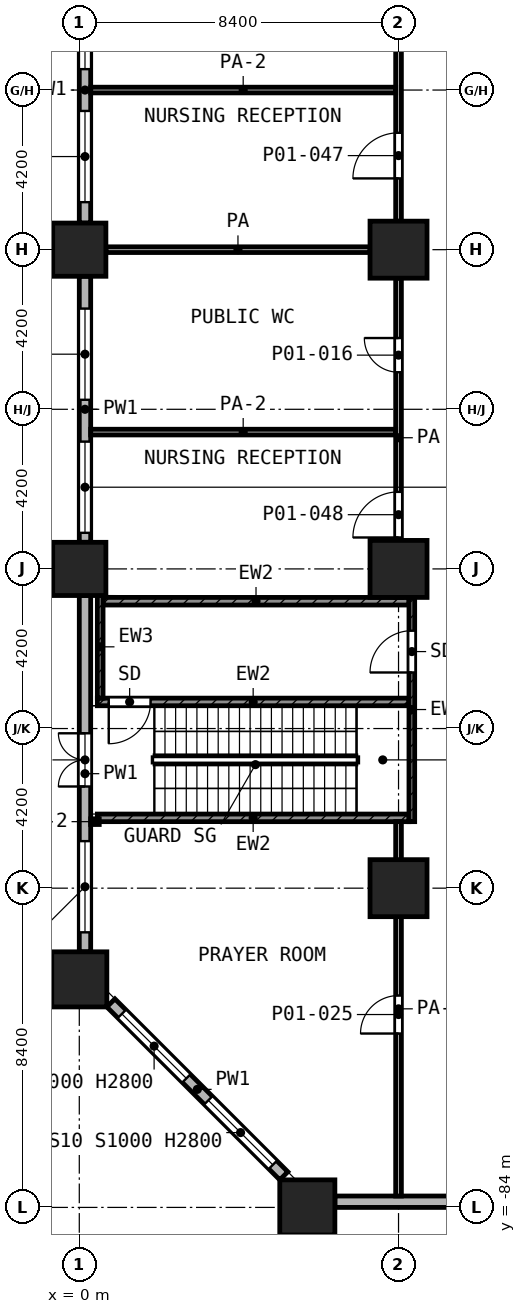
"""IFC4 building model, lengths in metres.
Left out: names, types, materials, properties, quantities, classifications, styles, units other than length and angle.
Written with IfcOpenShell. Run it as: python <this file> out.ifc"""

import sys

from ifc_helpers import new_model, si_unit, direction, frame, frame_2d, origin, origin_2d, place, context, subcontext, project, spatial, rectangle, extrude, element, fill, save


model = new_model("IFC4")
c1 = context("Model", 3, precision=1e-05, world=origin(), true_north=direction((0.0, 1.0)))
c2 = subcontext(c1, "Body", "Model", "MODEL_VIEW")
j1 = project(units=[si_unit("LENGTHUNIT", "METRE"), si_unit("PLANEANGLEUNIT", "RADIAN")], contexts=[c1])
p1 = place(None, origin())
s1 = spatial("IfcSite", under=j1, at=p1, CompositionType="ELEMENT")
p2 = place(p1, origin())
s2 = spatial("IfcBuilding", under=s1, at=p2, CompositionType="ELEMENT")
p3 = place(p2, origin())
s3 = spatial("IfcBuildingStorey", under=s2, at=p3, CompositionType="ELEMENT", Elevation=0.0)
p4 = place(p3, frame((0.0, -58.8, 0.0), z_axis=(0.0, 0.0, 1.0), x_axis=(1.0, 0.0, 0.0)))
e1 = element("IfcColumn", 1, at=p4, inside=s3, PredefinedType="COLUMN", context=c2, shape_type="SweptSolid", body=[
    extrude(rectangle(XDim=1.4, YDim=1.4, at=origin_2d()), origin(), (0.0, 0.0, 1.0), 7.0),
])
p5 = place(p3, frame((8.4, -58.8, 0.0), z_axis=(0.0, 0.0, 1.0), x_axis=(1.0, 0.0, 0.0)))
e2 = element("IfcColumn", 2, at=p5, inside=s3, PredefinedType="COLUMN", context=c2, shape_type="SweptSolid", body=[
    extrude(rectangle(XDim=1.5, YDim=1.5, at=origin_2d()), origin(), (0.0, 0.0, 1.0), 7.0),
])
p6 = place(p3, frame((0.0, -67.2, 0.0), z_axis=(0.0, 0.0, 1.0), x_axis=(1.0, 0.0, 0.0)))
e3 = element("IfcColumn", 3, at=p6, inside=s3, PredefinedType="COLUMN", context=c2, shape_type="SweptSolid", body=[
    extrude(rectangle(XDim=1.4, YDim=1.4, at=origin_2d()), origin(), (0.0, 0.0, 1.0), 7.0),
])
for number, where, z_axis, x_axis in (
    (4, (8.4, -67.2, 0.0), (0.0, 0.0, 1.0), (1.0, 0.0, 0.0)),
    (5, (8.4, -75.6, 0.0), (0.0, 0.0, 1.0), (1.0, 0.0, 0.0)),
):
    element("IfcColumn", number, at=place(p3, frame(where, z_axis=z_axis, x_axis=x_axis)), inside=s3, PredefinedType="COLUMN", context=c2, shape_type="SweptSolid", body=[
        extrude(rectangle(XDim=1.5, YDim=1.5, at=origin_2d()), origin(), (0.0, 0.0, 1.0), 7.0),
    ])
for number, where, z_axis, x_axis in (
    (6, (0.0, -78.0, 0.0), (0.0, 0.0, 1.0), (1.0, 0.0, 0.0)),
    (7, (6.0, -84.0, 0.0), (0.0, 0.0, 1.0), (1.0, 0.0, 0.0)),
):
    element("IfcColumn", number, at=place(p3, frame(where, z_axis=z_axis, x_axis=x_axis)), inside=s3, PredefinedType="COLUMN", context=c2, shape_type="SweptSolid", body=[
        extrude(rectangle(XDim=1.45, YDim=1.45, at=origin_2d()), origin(), (0.0, 0.0, 1.0), 7.0),
    ])
p7 = place(p3, frame((0.15, -51.1, 0.0), z_axis=(0.0, 0.0, 1.0), x_axis=(0.0, -1.0, 0.0)))
e8 = element("IfcWall", 8, at=p7, inside=s3, PredefinedType="SOLIDWALL", context=c2, shape_type="SweptSolid", body=[
    extrude(rectangle(XDim=7.0, YDim=0.3, at=frame_2d((3.5, 0.0))), origin(), (0.0, 0.0, 1.0), 5.25),
])
p8 = place(p7, frame((0.55, 0.0, 1.0)))
e9 = element("IfcOpeningElement", 9, at=p8, cuts=e8, PredefinedType="OPENING", context=c2, shape_type="SweptSolid", body=[
    extrude(rectangle(XDim=2.4, YDim=1.8, at=frame_2d((1.2, 0.9))), frame((0.0, 0.16, 0.0), z_axis=(0.0, -1.0, 0.0), x_axis=(1.0, 0.0, 0.0)), (0.0, 0.0, 1.0), 0.32),
])
p9 = place(p7, frame((4.05, 0.0, 1.0)))
e10 = element("IfcOpeningElement", 10, at=p9, cuts=e8, PredefinedType="OPENING", context=c2, shape_type="SweptSolid", body=[
    extrude(rectangle(XDim=2.4, YDim=1.8, at=frame_2d((1.2, 0.9))), frame((0.0, 0.16, 0.0), z_axis=(0.0, -1.0, 0.0), x_axis=(1.0, 0.0, 0.0)), (0.0, 0.0, 1.0), 0.32),
])
p10 = place(p3, frame((0.15, -59.5, 0.0), z_axis=(0.0, 0.0, 1.0), x_axis=(0.0, -1.0, 0.0)))
e11 = element("IfcWall", 11, at=p10, inside=s3, PredefinedType="SOLIDWALL", context=c2, shape_type="SweptSolid", body=[
    extrude(rectangle(XDim=7.0, YDim=0.3, at=frame_2d((3.5, 0.0))), origin(), (0.0, 0.0, 1.0), 5.25),
])
p11 = place(p10, frame((0.85, 0.0, 1.0)))
e12 = element("IfcOpeningElement", 12, at=p11, cuts=e11, PredefinedType="OPENING", context=c2, shape_type="SweptSolid", body=[
    extrude(rectangle(XDim=2.4, YDim=1.8, at=frame_2d((1.2, 0.9))), frame((0.0, 0.16, 0.0), z_axis=(0.0, -1.0, 0.0), x_axis=(1.0, 0.0, 0.0)), (0.0, 0.0, 1.0), 0.32),
])
p12 = place(p10, frame((4.35, 0.0, 1.0)))
e13 = element("IfcOpeningElement", 13, at=p12, cuts=e11, PredefinedType="OPENING", context=c2, shape_type="SweptSolid", body=[
    extrude(rectangle(XDim=2.4, YDim=1.8, at=frame_2d((1.2, 0.9))), frame((0.0, 0.16, 0.0), z_axis=(0.0, -1.0, 0.0), x_axis=(1.0, 0.0, 0.0)), (0.0, 0.0, 1.0), 0.32),
])
p13 = place(p3, frame((0.15, -67.9, 0.0), z_axis=(0.0, 0.0, 1.0), x_axis=(0.0, -1.0, 0.0)))
e14 = element("IfcWall", 14, at=p13, inside=s3, PredefinedType="SOLIDWALL", context=c2, shape_type="SweptSolid", body=[
    extrude(rectangle(XDim=9.375, YDim=0.3, at=frame_2d((4.688, 0.0))), origin(), (0.0, 0.0, 1.0), 5.25),
])
p14 = place(p13, frame((3.625, 0.0, 0.0)))
e15 = element("IfcOpeningElement", 15, at=p14, cuts=e14, PredefinedType="OPENING", context=c2, shape_type="SweptSolid", body=[
    extrude(rectangle(XDim=1.4, YDim=2.1, at=frame_2d((0.7, 1.05))), frame((0.0, 0.16, 0.0), z_axis=(0.0, -1.0, 0.0), x_axis=(1.0, 0.0, 0.0)), (0.0, 0.0, 1.0), 0.32),
])
p15 = place(p13, frame((6.462, 0.0, 1.0)))
e16 = element("IfcOpeningElement", 16, at=p15, cuts=e14, PredefinedType="OPENING", context=c2, shape_type="SweptSolid", body=[
    extrude(rectangle(XDim=2.4, YDim=1.8, at=frame_2d((1.2, 0.9))), frame((0.0, 0.16, 0.0), z_axis=(0.0, -1.0, 0.0), x_axis=(1.0, 0.0, 0.0)), (0.0, 0.0, 1.0), 0.32),
])
p16 = place(p3, frame((0.831, -78.619, 0.0), z_axis=(0.0, 0.0, 1.0), x_axis=(0.707106781187, -0.707106781187, 0.0)))
e17 = element("IfcWall", 17, at=p16, inside=s3, PredefinedType="SOLIDWALL", context=c2, shape_type="SweptSolid", body=[
    extrude(rectangle(XDim=6.435, YDim=0.3, at=frame_2d((3.217, 0.0))), origin(), (0.0, 0.0, 1.0), 5.25),
])
p17 = place(p16, frame((0.409, 0.0, 1.0)))
e18 = element("IfcOpeningElement", 18, at=p17, cuts=e17, PredefinedType="OPENING", context=c2, shape_type="SweptSolid", body=[
    extrude(rectangle(XDim=2.4, YDim=1.8, at=frame_2d((1.2, 0.9))), frame((0.0, 0.16, 0.0), z_axis=(0.0, -1.0, 0.0), x_axis=(1.0, 0.0, 0.0)), (0.0, 0.0, 1.0), 0.32),
])
p18 = place(p16, frame((3.626, 0.0, 1.0)))
e19 = element("IfcOpeningElement", 19, at=p18, cuts=e17, PredefinedType="OPENING", context=c2, shape_type="SweptSolid", body=[
    extrude(rectangle(XDim=2.4, YDim=1.8, at=frame_2d((1.2, 0.9))), frame((0.0, 0.16, 0.0), z_axis=(0.0, -1.0, 0.0), x_axis=(1.0, 0.0, 0.0)), (0.0, 0.0, 1.0), 0.32),
])
p19 = place(p3, frame((6.725, -83.85, 0.0), z_axis=(0.0, 0.0, 1.0), x_axis=(1.0, 0.0, 0.0)))
e20 = element("IfcWall", 20, at=p19, inside=s3, PredefinedType="SOLIDWALL", context=c2, shape_type="SweptSolid", body=[
    extrude(rectangle(XDim=9.375, YDim=0.3, at=frame_2d((4.688, 0.0))), origin(), (0.0, 0.0, 1.0), 5.25),
])
p20 = place(p19, frame((3.775, 0.0, 0.0)))
e21 = element("IfcOpeningElement", 21, at=p20, cuts=e20, PredefinedType="OPENING", context=c2, shape_type="SweptSolid", body=[
    extrude(rectangle(XDim=1.0, YDim=2.1, at=frame_2d((0.5, 1.05))), frame((0.0, 0.16, 0.0), z_axis=(0.0, -1.0, 0.0), x_axis=(1.0, 0.0, 0.0)), (0.0, 0.0, 1.0), 0.32),
])
p21 = place(p3, frame((0.55, -70.6, 0.0), z_axis=(0.0, 0.0, 1.0), x_axis=(0.0, 1.0, 0.0)))
e22 = element("IfcWall", 22, at=p21, inside=s3, PredefinedType="SHEAR", context=c2, shape_type="SweptSolid", body=[
    extrude(rectangle(XDim=2.7, YDim=0.15, at=frame_2d((1.35, 0.0))), origin(), (0.0, 0.0, 1.0), 6.65),
])
p22 = place(p3, frame((8.75, -73.85, 0.0), z_axis=(0.0, 0.0, 1.0), x_axis=(0.0, 1.0, 0.0)))
e23 = element("IfcWall", 23, at=p22, inside=s3, PredefinedType="SHEAR", context=c2, shape_type="SweptSolid", body=[
    extrude(rectangle(XDim=5.9, YDim=0.15, at=frame_2d((2.95, 0.0))), origin(), (0.0, 0.0, 1.0), 6.65),
])
p23 = place(p22, frame((3.925, 0.0, 0.0)))
e24 = element("IfcOpeningElement", 24, at=p23, cuts=e23, PredefinedType="OPENING", context=c2, shape_type="SweptSolid", body=[
    extrude(rectangle(XDim=1.1, YDim=2.1, at=frame_2d((0.55, 1.05))), frame((0.0, 0.085, 0.0), z_axis=(0.0, -1.0, 0.0), x_axis=(1.0, 0.0, 0.0)), (0.0, 0.0, 1.0), 0.17),
])
p24 = place(p3, frame((0.475, -73.75, 0.0), z_axis=(0.0, 0.0, 1.0), x_axis=(1.0, 0.0, 0.0)))
e25 = element("IfcWall", 25, at=p24, inside=s3, PredefinedType="SHEAR", context=c2, shape_type="SweptSolid", body=[
    extrude(rectangle(XDim=8.2, YDim=0.2, at=frame_2d((4.1, 0.0))), origin(), (0.0, 0.0, 1.0), 6.65),
])
p25 = place(p3, frame((0.475, -70.7, 0.0), z_axis=(0.0, 0.0, 1.0), x_axis=(1.0, 0.0, 0.0)))
e26 = element("IfcWall", 26, at=p25, inside=s3, PredefinedType="SHEAR", context=c2, shape_type="SweptSolid", body=[
    extrude(rectangle(XDim=8.2, YDim=0.2, at=frame_2d((4.1, 0.0))), origin(), (0.0, 0.0, 1.0), 6.65),
])
p26 = place(p25, frame((0.3, 0.0, 0.0)))
e27 = element("IfcOpeningElement", 27, at=p26, cuts=e26, PredefinedType="OPENING", context=c2, shape_type="SweptSolid", body=[
    extrude(rectangle(XDim=1.1, YDim=2.1, at=frame_2d((0.55, 1.05))), frame((0.0, 0.11, 0.0), z_axis=(0.0, -1.0, 0.0), x_axis=(1.0, 0.0, 0.0)), (0.0, 0.0, 1.0), 0.22),
])
p27 = place(p3, frame((0.625, -68.05, 0.0), z_axis=(0.0, 0.0, 1.0), x_axis=(1.0, 0.0, 0.0)))
e28 = element("IfcWall", 28, at=p27, inside=s3, PredefinedType="SHEAR", context=c2, shape_type="SweptSolid", body=[
    extrude(rectangle(XDim=8.05, YDim=0.2, at=frame_2d((4.025, 0.0))), origin(), (0.0, 0.0, 1.0), 6.65),
])
p28 = place(p3, frame((0.3, -73.85, 0.0), z_axis=(0.0, 0.0, 1.0), x_axis=(1.0, 0.0, 0.0)))
e29 = element("IfcWall", 29, at=p28, inside=s3, PredefinedType="PARTITIONING", context=c2, shape_type="SweptSolid", body=[
    extrude(rectangle(XDim=0.225, YDim=0.15, at=frame_2d((0.112, 0.0))), origin(), (0.0, 0.0, 1.0), 5.25),
])
p29 = place(p3, frame((0.3, -63.6, 0.0), z_axis=(0.0, 0.0, 1.0), x_axis=(1.0, 0.0, 0.0)))
e30 = element("IfcWall", 30, at=p29, inside=s3, PredefinedType="PARTITIONING", context=c2, shape_type="SweptSolid", body=[
    extrude(rectangle(XDim=8.025, YDim=0.15, at=frame_2d((4.012, 0.0))), origin(), (0.0, 0.0, 1.0), 5.25),
])
p30 = place(p3, frame((0.7, -58.8, 0.0), z_axis=(0.0, 0.0, 1.0), x_axis=(1.0, 0.0, 0.0)))
e31 = element("IfcWall", 31, at=p30, inside=s3, PredefinedType="PARTITIONING", context=c2, shape_type="SweptSolid", body=[
    extrude(rectangle(XDim=6.95, YDim=0.15, at=frame_2d((3.475, 0.0))), origin(), (0.0, 0.0, 1.0), 6.65),
])
p31 = place(p3, frame((0.3, -54.6, 0.0), z_axis=(0.0, 0.0, 1.0), x_axis=(1.0, 0.0, 0.0)))
e32 = element("IfcWall", 32, at=p31, inside=s3, PredefinedType="PARTITIONING", context=c2, shape_type="SweptSolid", body=[
    extrude(rectangle(XDim=8.025, YDim=0.15, at=frame_2d((4.012, 0.0))), origin(), (0.0, 0.0, 1.0), 5.25),
])
p32 = place(p3, frame((8.4, -83.7, 0.0), z_axis=(0.0, 0.0, 1.0), x_axis=(0.0, 1.0, 0.0)))
e33 = element("IfcWall", 33, at=p32, inside=s3, PredefinedType="PARTITIONING", context=c2, shape_type="SweptSolid", body=[
    extrude(rectangle(XDim=9.85, YDim=0.15, at=frame_2d((4.925, 0.0))), origin(), (0.0, 0.0, 1.0), 5.25),
])
p33 = place(p32, frame((4.275, 0.0, 0.0)))
e34 = element("IfcOpeningElement", 34, at=p33, cuts=e33, PredefinedType="OPENING", context=c2, shape_type="SweptSolid", body=[
    extrude(rectangle(XDim=1.0, YDim=2.1, at=frame_2d((0.5, 1.05))), frame((0.0, 0.085, 0.0), z_axis=(0.0, -1.0, 0.0), x_axis=(1.0, 0.0, 0.0)), (0.0, 0.0, 1.0), 0.17),
])
p34 = place(p3, frame((8.4, -67.947, 0.0), z_axis=(0.0, 0.0, 1.0), x_axis=(0.0, 1.0, 0.0)))
e35 = element("IfcWall", 35, at=p34, inside=s3, PredefinedType="PARTITIONING", context=c2, shape_type="SweptSolid", body=[
    extrude(rectangle(XDim=8.397, YDim=0.15, at=frame_2d((4.198, 0.0))), origin(), (0.0, 0.0, 1.0), 6.65),
])
p35 = place(p34, frame((5.922, 0.0, 0.0)))
e36 = element("IfcOpeningElement", 36, at=p35, cuts=e35, PredefinedType="OPENING", context=c2, shape_type="SweptSolid", body=[
    extrude(rectangle(XDim=0.9, YDim=2.1, at=frame_2d((0.45, 1.05))), frame((0.0, 0.085, 0.0), z_axis=(0.0, -1.0, 0.0), x_axis=(1.0, 0.0, 0.0)), (0.0, 0.0, 1.0), 0.17),
])
p36 = place(p34, frame((1.574, 0.0, 0.0)))
e37 = element("IfcOpeningElement", 37, at=p36, cuts=e35, PredefinedType="OPENING", context=c2, shape_type="SweptSolid", body=[
    extrude(rectangle(XDim=1.2, YDim=2.1, at=frame_2d((0.6, 1.05))), frame((0.0, 0.085, 0.0), z_axis=(0.0, -1.0, 0.0), x_axis=(1.0, 0.0, 0.0)), (0.0, 0.0, 1.0), 0.17),
])
p37 = place(p3, frame((8.4, -58.05, 0.0), z_axis=(0.0, 0.0, 1.0), x_axis=(0.0, 1.0, 0.0)))
e38 = element("IfcWall", 38, at=p37, inside=s3, PredefinedType="PARTITIONING", context=c2, shape_type="SweptSolid", body=[
    extrude(rectangle(XDim=15.7, YDim=0.15, at=frame_2d((7.85, 0.0))), origin(), (0.0, 0.0, 1.0), 6.65),
])
p38 = place(p37, frame((8.975, 0.0, 0.0)))
e39 = element("IfcOpeningElement", 39, at=p38, cuts=e38, PredefinedType="OPENING", context=c2, shape_type="SweptSolid", body=[
    extrude(rectangle(XDim=1.2, YDim=2.1, at=frame_2d((0.6, 1.05))), frame((0.0, 0.085, 0.0), z_axis=(0.0, -1.0, 0.0), x_axis=(1.0, 0.0, 0.0)), (0.0, 0.0, 1.0), 0.17),
])
p39 = place(p37, frame((1.125, 0.0, 0.0)))
e40 = element("IfcOpeningElement", 40, at=p39, cuts=e38, PredefinedType="OPENING", context=c2, shape_type="SweptSolid", body=[
    extrude(rectangle(XDim=1.2, YDim=2.1, at=frame_2d((0.6, 1.05))), frame((0.0, 0.085, 0.0), z_axis=(0.0, -1.0, 0.0), x_axis=(1.0, 0.0, 0.0)), (0.0, 0.0, 1.0), 0.17),
])
p40 = place(p8, origin())
e41 = element("IfcWindow", 41, at=p40, inside=s3, PartitioningType="SINGLE_PANEL", PredefinedType="WINDOW", context=c2, shape_type="SweptSolid", body=[
    extrude(rectangle(XDim=2.4, YDim=1.8, at=frame_2d((1.2, 0.9))), frame((0.0, 0.03, 0.0), z_axis=(0.0, -1.0, 0.0), x_axis=(1.0, 0.0, 0.0)), (0.0, 0.0, 1.0), 0.06),
])
fill(e9, e41)
p41 = place(p9, origin())
e42 = element("IfcWindow", 42, at=p41, inside=s3, PartitioningType="SINGLE_PANEL", PredefinedType="WINDOW", context=c2, shape_type="SweptSolid", body=[
    extrude(rectangle(XDim=2.4, YDim=1.8, at=frame_2d((1.2, 0.9))), frame((0.0, 0.03, 0.0), z_axis=(0.0, -1.0, 0.0), x_axis=(1.0, 0.0, 0.0)), (0.0, 0.0, 1.0), 0.06),
])
fill(e10, e42)
p42 = place(p11, origin())
e43 = element("IfcWindow", 43, at=p42, inside=s3, PartitioningType="SINGLE_PANEL", PredefinedType="WINDOW", context=c2, shape_type="SweptSolid", body=[
    extrude(rectangle(XDim=2.4, YDim=1.8, at=frame_2d((1.2, 0.9))), frame((0.0, 0.03, 0.0), z_axis=(0.0, -1.0, 0.0), x_axis=(1.0, 0.0, 0.0)), (0.0, 0.0, 1.0), 0.06),
])
fill(e12, e43)
p43 = place(p12, origin())
e44 = element("IfcWindow", 44, at=p43, inside=s3, PartitioningType="SINGLE_PANEL", PredefinedType="WINDOW", context=c2, shape_type="SweptSolid", body=[
    extrude(rectangle(XDim=2.4, YDim=1.8, at=frame_2d((1.2, 0.9))), frame((0.0, 0.03, 0.0), z_axis=(0.0, -1.0, 0.0), x_axis=(1.0, 0.0, 0.0)), (0.0, 0.0, 1.0), 0.06),
])
fill(e13, e44)
p44 = place(p14, frame((1.4, 0.0, 0.0), z_axis=(0.0, 0.0, 1.0), x_axis=(-1.0, 0.0, 0.0)))
e45 = element("IfcDoor", 45, at=p44, inside=s3, OperationType="DOUBLE_DOOR_SINGLE_SWING", PredefinedType="DOOR", context=c2, shape_type="SweptSolid", body=[
    extrude(rectangle(XDim=1.4, YDim=2.1, at=frame_2d((0.7, 1.05))), frame((0.0, 0.025, 0.0), z_axis=(0.0, -1.0, 0.0), x_axis=(1.0, 0.0, 0.0)), (0.0, 0.0, 1.0), 0.05),
])
fill(e15, e45)
p45 = place(p15, origin())
e46 = element("IfcWindow", 46, at=p45, inside=s3, PartitioningType="SINGLE_PANEL", PredefinedType="WINDOW", context=c2, shape_type="SweptSolid", body=[
    extrude(rectangle(XDim=2.4, YDim=1.8, at=frame_2d((1.2, 0.9))), frame((0.0, 0.03, 0.0), z_axis=(0.0, -1.0, 0.0), x_axis=(1.0, 0.0, 0.0)), (0.0, 0.0, 1.0), 0.06),
])
fill(e16, e46)
p46 = place(p17, origin())
e47 = element("IfcWindow", 47, at=p46, inside=s3, PartitioningType="SINGLE_PANEL", PredefinedType="WINDOW", context=c2, shape_type="SweptSolid", body=[
    extrude(rectangle(XDim=2.4, YDim=1.8, at=frame_2d((1.2, 0.9))), frame((0.0, 0.03, 0.0), z_axis=(0.0, -1.0, 0.0), x_axis=(1.0, 0.0, 0.0)), (0.0, 0.0, 1.0), 0.06),
])
fill(e18, e47)
p47 = place(p18, origin())
e48 = element("IfcWindow", 48, at=p47, inside=s3, PartitioningType="SINGLE_PANEL", PredefinedType="WINDOW", context=c2, shape_type="SweptSolid", body=[
    extrude(rectangle(XDim=2.4, YDim=1.8, at=frame_2d((1.2, 0.9))), frame((0.0, 0.03, 0.0), z_axis=(0.0, -1.0, 0.0), x_axis=(1.0, 0.0, 0.0)), (0.0, 0.0, 1.0), 0.06),
])
fill(e19, e48)
p48 = place(p26, frame((1.1, 0.0, 0.0), z_axis=(0.0, 0.0, 1.0), x_axis=(-1.0, 0.0, 0.0)))
e49 = element("IfcDoor", 49, at=p48, inside=s3, OperationType="SINGLE_SWING_LEFT", PredefinedType="DOOR", context=c2, shape_type="SweptSolid", body=[
    extrude(rectangle(XDim=1.1, YDim=2.1, at=frame_2d((0.55, 1.05))), frame((0.0, 0.025, 0.0), z_axis=(0.0, -1.0, 0.0), x_axis=(1.0, 0.0, 0.0)), (0.0, 0.0, 1.0), 0.05),
])
fill(e27, e49)
p49 = place(p23, origin())
e50 = element("IfcDoor", 50, at=p49, inside=s3, OperationType="SINGLE_SWING_LEFT", PredefinedType="DOOR", context=c2, shape_type="SweptSolid", body=[
    extrude(rectangle(XDim=1.1, YDim=2.1, at=frame_2d((0.55, 1.05))), frame((0.0, 0.025, 0.0), z_axis=(0.0, -1.0, 0.0), x_axis=(1.0, 0.0, 0.0)), (0.0, 0.0, 1.0), 0.05),
])
fill(e24, e50)
p50 = place(p39, origin())
e51 = element("IfcDoor", 51, at=p50, inside=s3, OperationType="SINGLE_SWING_LEFT", PredefinedType="DOOR", context=c2, shape_type="SweptSolid", body=[
    extrude(rectangle(XDim=1.2, YDim=2.1, at=frame_2d((0.6, 1.05))), frame((0.0, 0.025, 0.0), z_axis=(0.0, -1.0, 0.0), x_axis=(1.0, 0.0, 0.0)), (0.0, 0.0, 1.0), 0.05),
])
fill(e40, e51)
p51 = place(p35, origin())
e52 = element("IfcDoor", 52, at=p51, inside=s3, OperationType="SINGLE_SWING_RIGHT", PredefinedType="DOOR", context=c2, shape_type="SweptSolid", body=[
    extrude(rectangle(XDim=0.9, YDim=2.1, at=frame_2d((0.45, 1.05))), frame((0.0, 0.025, 0.0), z_axis=(0.0, -1.0, 0.0), x_axis=(1.0, 0.0, 0.0)), (0.0, 0.0, 1.0), 0.05),
])
fill(e36, e52)
p52 = place(p36, origin())
e53 = element("IfcDoor", 53, at=p52, inside=s3, OperationType="SINGLE_SWING_LEFT", PredefinedType="DOOR", context=c2, shape_type="SweptSolid", body=[
    extrude(rectangle(XDim=1.2, YDim=2.1, at=frame_2d((0.6, 1.05))), frame((0.0, 0.025, 0.0), z_axis=(0.0, -1.0, 0.0), x_axis=(1.0, 0.0, 0.0)), (0.0, 0.0, 1.0), 0.05),
])
fill(e37, e53)
p53 = place(p33, origin())
e54 = element("IfcDoor", 54, at=p53, inside=s3, OperationType="SINGLE_SWING_LEFT", PredefinedType="DOOR", context=c2, shape_type="SweptSolid", body=[
    extrude(rectangle(XDim=1.0, YDim=2.1, at=frame_2d((0.5, 1.05))), frame((0.0, 0.025, 0.0), z_axis=(0.0, -1.0, 0.0), x_axis=(1.0, 0.0, 0.0)), (0.0, 0.0, 1.0), 0.05),
])
fill(e34, e54)
save(model, sys.argv[1])
